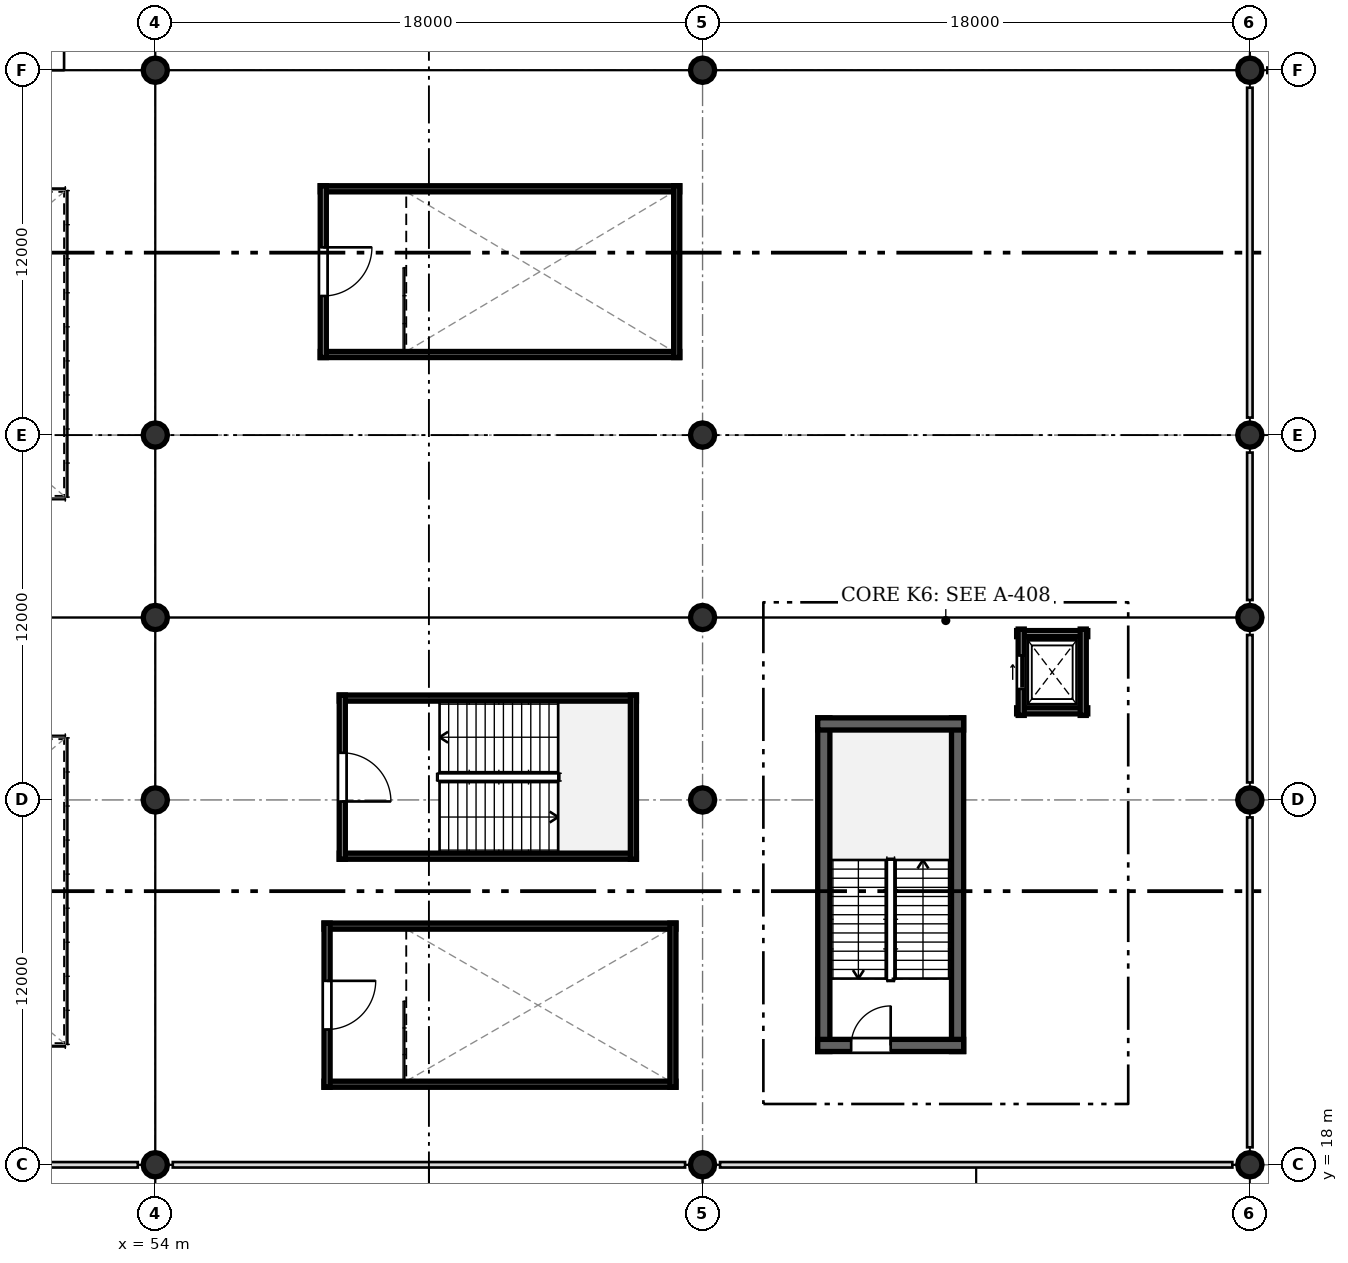
"""IFC4 building model, lengths in metres.
Left out: names, types, materials, properties, quantities, classifications, styles, units other than length and angle.
Written with IfcOpenShell. Run it as: python <this file> out.ifc"""

import sys

from ifc_helpers import new_model, si_unit, direction, frame, frame_2d, origin, origin_2d, place, context, subcontext, project, spatial, rectangle, circle, extrude, element, fill, save


model = new_model("IFC4")
c1 = context("Model", 3, precision=1e-05, world=origin(), true_north=direction((0.0, 1.0)))
c2 = subcontext(c1, "Body", "Model", "MODEL_VIEW")
j1 = project(units=[si_unit("LENGTHUNIT", "METRE"), si_unit("PLANEANGLEUNIT", "RADIAN")], contexts=[c1])
p1 = place(None, origin())
s1 = spatial("IfcSite", under=j1, at=p1, CompositionType="ELEMENT")
p2 = place(p1, origin())
s2 = spatial("IfcBuilding", under=s1, at=p2, CompositionType="ELEMENT")
p3 = place(p2, frame((0.0, 0.0, 6.6)))
s3 = spatial("IfcBuildingStorey", under=s2, at=p3, CompositionType="ELEMENT", Elevation=6.6)
for number, where, z_axis, x_axis in (
    (1, (54.0, 18.0, 0.0), (0.0, 0.0, 1.0), (1.0, 0.0, 0.0)),
    (2, (54.0, 30.0, 0.0), (0.0, 0.0, 1.0), (1.0, 0.0, 0.0)),
    (3, (54.0, 36.0, 0.0), (0.0, 0.0, 1.0), (1.0, 0.0, 0.0)),
    (4, (54.0, 42.0, 0.0), (0.0, 0.0, 1.0), (1.0, 0.0, 0.0)),
    (5, (54.0, 54.0, 0.0), (0.0, 0.0, 1.0), (1.0, 0.0, 0.0)),
    (6, (72.0, 18.0, 0.0), (0.0, 0.0, 1.0), (1.0, 0.0, 0.0)),
    (7, (72.0, 30.0, 0.0), (0.0, 0.0, 1.0), (1.0, 0.0, 0.0)),
    (8, (72.0, 36.0, 0.0), (0.0, 0.0, 1.0), (1.0, 0.0, 0.0)),
    (9, (72.0, 42.0, 0.0), (0.0, 0.0, 1.0), (1.0, 0.0, 0.0)),
    (10, (72.0, 54.0, 0.0), (0.0, 0.0, 1.0), (1.0, 0.0, 0.0)),
    (11, (90.0, 18.0, 0.0), (0.0, 0.0, 1.0), (1.0, 0.0, 0.0)),
    (12, (90.0, 30.0, 0.0), (0.0, 0.0, 1.0), (1.0, 0.0, 0.0)),
    (13, (90.0, 36.0, 0.0), (0.0, 0.0, 1.0), (1.0, 0.0, 0.0)),
    (14, (90.0, 42.0, 0.0), (0.0, 0.0, 1.0), (1.0, 0.0, 0.0)),
    (15, (90.0, 54.0, 0.0), (0.0, 0.0, 1.0), (1.0, 0.0, 0.0)),
):
    element("IfcColumn", number, at=place(p3, frame(where, z_axis=z_axis, x_axis=x_axis)), inside=s3, PredefinedType="COLUMN", context=c2, shape_type="SweptSolid", body=[
        extrude(circle(Radius=0.4, at=origin_2d()), origin(), (0.0, 0.0, 1.0), 4.2),
    ])
for number, where, z_axis, x_axis in (
    (16, (80.387, 21.725, 0.0), (0.0, 0.0, 1.0), (0.0, 1.0, 0.0)),
    (17, (75.988, 32.7, 0.0), (0.0, 0.0, 1.0), (0.0, -1.0, 0.0)),
):
    element("IfcWall", number, at=place(p3, frame(where, z_axis=z_axis, x_axis=x_axis)), inside=s3, PredefinedType="SHEAR", context=c2, shape_type="SweptSolid", body=[
        extrude(rectangle(XDim=10.975, YDim=0.4, at=frame_2d((5.487, 0.0))), origin(), (0.0, 0.0, 1.0), 3.98),
    ])
p4 = place(p3, frame((80.587, 32.5, 0.0), z_axis=(0.0, 0.0, 1.0), x_axis=(-1.0, 0.0, 0.0)))
e18 = element("IfcWall", 18, at=p4, inside=s3, PredefinedType="SHEAR", context=c2, shape_type="SweptSolid", body=[
    extrude(rectangle(XDim=4.8, YDim=0.4, at=frame_2d((2.4, 0.0))), origin(), (0.0, 0.0, 1.0), 3.98),
])
p5 = place(p3, frame((75.788, 21.925, 0.0), z_axis=(0.0, 0.0, 1.0), x_axis=(1.0, 0.0, 0.0)))
e19 = element("IfcWall", 19, at=p5, inside=s3, PredefinedType="SHEAR", context=c2, shape_type="SweptSolid", body=[
    extrude(rectangle(XDim=4.8, YDim=0.4, at=frame_2d((2.4, 0.0))), origin(), (0.0, 0.0, 1.0), 3.98),
])
p6 = place(p5, frame((1.1, 0.0, 0.0)))
e20 = element("IfcOpeningElement", 20, at=p6, cuts=e19, PredefinedType="OPENING", context=c2, shape_type="SweptSolid", body=[
    extrude(rectangle(XDim=1.3, YDim=2.1, at=frame_2d((0.65, 1.05))), frame((0.0, 0.21, 0.0), z_axis=(0.0, -1.0, 0.0), x_axis=(1.0, 0.0, 0.0)), (0.0, 0.0, 1.0), 0.42),
])
for number, where, z_axis, x_axis in (
    (21, (59.55, 20.65, 0.0), (0.0, 0.0, 1.0), (1.0, 0.0, 0.0)),
    (22, (71.125, 25.85, 0.0), (0.0, 0.0, 1.0), (-1.0, 0.0, 0.0)),
):
    element("IfcWall", number, at=place(p3, frame(where, z_axis=z_axis, x_axis=x_axis)), inside=s3, PredefinedType="SOLIDWALL", context=c2, shape_type="SweptSolid", body=[
        extrude(rectangle(XDim=11.575, YDim=0.2, at=frame_2d((5.788, 0.0))), origin(), (0.0, 0.0, 1.0), 2.45),
    ])
p7 = place(p3, frame((71.025, 20.55, 0.0), z_axis=(0.0, 0.0, 1.0), x_axis=(0.0, 1.0, 0.0)))
e23 = element("IfcWall", 23, at=p7, inside=s3, PredefinedType="SOLIDWALL", context=c2, shape_type="SweptSolid", body=[
    extrude(rectangle(XDim=5.4, YDim=0.2, at=frame_2d((2.7, 0.0))), origin(), (0.0, 0.0, 1.0), 2.45),
])
p8 = place(p3, frame((59.65, 25.95, 0.0), z_axis=(0.0, 0.0, 1.0), x_axis=(0.0, -1.0, 0.0)))
e24 = element("IfcWall", 24, at=p8, inside=s3, PredefinedType="SOLIDWALL", context=c2, shape_type="SweptSolid", body=[
    extrude(rectangle(XDim=5.4, YDim=0.2, at=frame_2d((2.7, 0.0))), origin(), (0.0, 0.0, 1.0), 2.45),
])
p9 = place(p8, frame((1.9, 0.0, 0.0)))
e25 = element("IfcOpeningElement", 25, at=p9, cuts=e24, PredefinedType="OPENING", context=c2, shape_type="SweptSolid", body=[
    extrude(rectangle(XDim=1.6, YDim=2.15, at=frame_2d((0.8, 1.075))), frame((0.0, 0.11, 0.0), z_axis=(0.0, -1.0, 0.0), x_axis=(1.0, 0.0, 0.0)), (0.0, 0.0, 1.0), 0.22),
])
for number, where, z_axis, x_axis in (
    (26, (59.425, 44.65, 0.0), (0.0, 0.0, 1.0), (1.0, 0.0, 0.0)),
    (27, (71.25, 50.1, 0.0), (0.0, 0.0, 1.0), (-1.0, 0.0, 0.0)),
):
    element("IfcWall", number, at=place(p3, frame(where, z_axis=z_axis, x_axis=x_axis)), inside=s3, PredefinedType="SOLIDWALL", context=c2, shape_type="SweptSolid", body=[
        extrude(rectangle(XDim=11.825, YDim=0.2, at=frame_2d((5.913, 0.0))), origin(), (0.0, 0.0, 1.0), 2.45),
    ])
p10 = place(p3, frame((71.15, 44.55, 0.0), z_axis=(0.0, 0.0, 1.0), x_axis=(0.0, 1.0, 0.0)))
e28 = element("IfcWall", 28, at=p10, inside=s3, PredefinedType="SOLIDWALL", context=c2, shape_type="SweptSolid", body=[
    extrude(rectangle(XDim=5.65, YDim=0.2, at=frame_2d((2.825, 0.0))), origin(), (0.0, 0.0, 1.0), 2.45),
])
p11 = place(p3, frame((59.525, 50.2, 0.0), z_axis=(0.0, 0.0, 1.0), x_axis=(0.0, -1.0, 0.0)))
e29 = element("IfcWall", 29, at=p11, inside=s3, PredefinedType="SOLIDWALL", context=c2, shape_type="SweptSolid", body=[
    extrude(rectangle(XDim=5.65, YDim=0.2, at=frame_2d((2.825, 0.0))), origin(), (0.0, 0.0, 1.0), 2.45),
])
p12 = place(p11, frame((2.025, 0.0, 0.0)))
e30 = element("IfcOpeningElement", 30, at=p12, cuts=e29, PredefinedType="OPENING", context=c2, shape_type="SweptSolid", body=[
    extrude(rectangle(XDim=1.6, YDim=2.15, at=frame_2d((0.8, 1.075))), frame((0.0, 0.11, 0.0), z_axis=(0.0, -1.0, 0.0), x_axis=(1.0, 0.0, 0.0)), (0.0, 0.0, 1.0), 0.22),
])
for number, where, z_axis, x_axis in (
    (31, (60.05, 28.15, 0.0), (0.0, 0.0, 1.0), (1.0, 0.0, 0.0)),
    (32, (69.825, 33.35, 0.0), (0.0, 0.0, 1.0), (-1.0, 0.0, 0.0)),
):
    element("IfcWall", number, at=place(p3, frame(where, z_axis=z_axis, x_axis=x_axis)), inside=s3, PredefinedType="SOLIDWALL", context=c2, shape_type="SweptSolid", body=[
        extrude(rectangle(XDim=9.775, YDim=0.2, at=frame_2d((4.887, 0.0))), origin(), (0.0, 0.0, 1.0), 3.98),
    ])
p13 = place(p3, frame((69.725, 28.05, 0.0), z_axis=(0.0, 0.0, 1.0), x_axis=(0.0, 1.0, 0.0)))
e33 = element("IfcWall", 33, at=p13, inside=s3, PredefinedType="SOLIDWALL", context=c2, shape_type="SweptSolid", body=[
    extrude(rectangle(XDim=5.4, YDim=0.2, at=frame_2d((2.7, 0.0))), origin(), (0.0, 0.0, 1.0), 3.98),
])
p14 = place(p3, frame((60.15, 33.45, 0.0), z_axis=(0.0, 0.0, 1.0), x_axis=(0.0, -1.0, 0.0)))
e34 = element("IfcWall", 34, at=p14, inside=s3, PredefinedType="SOLIDWALL", context=c2, shape_type="SweptSolid", body=[
    extrude(rectangle(XDim=5.4, YDim=0.2, at=frame_2d((2.7, 0.0))), origin(), (0.0, 0.0, 1.0), 3.955),
])
p15 = place(p14, frame((1.9, 0.0, 0.0)))
e35 = element("IfcOpeningElement", 35, at=p15, cuts=e34, PredefinedType="OPENING", context=c2, shape_type="SweptSolid", body=[
    extrude(rectangle(XDim=1.6, YDim=2.15, at=frame_2d((0.8, 1.075))), frame((0.0, 0.11, 0.0), z_axis=(0.0, -1.0, 0.0), x_axis=(1.0, 0.0, 0.0)), (0.0, 0.0, 1.0), 0.22),
])
p16 = place(p3, frame((82.33, 32.93, 0.0), z_axis=(0.0, 0.0, 1.0), x_axis=(1.0, 0.0, 0.0)))
e36 = element("IfcWall", 36, at=p16, inside=s3, PredefinedType="SOLIDWALL", context=c2, shape_type="SweptSolid", body=[
    extrude(rectangle(XDim=2.34, YDim=0.2, at=frame_2d((1.17, 0.0))), origin(), (0.0, 0.0, 1.0), 3.955),
])
p17 = place(p3, frame((84.67, 35.47, 0.0), z_axis=(0.0, 0.0, 1.0), x_axis=(-1.0, 0.0, 0.0)))
e37 = element("IfcWall", 37, at=p17, inside=s3, PredefinedType="SOLIDWALL", context=c2, shape_type="SweptSolid", body=[
    extrude(rectangle(XDim=2.34, YDim=0.2, at=frame_2d((1.17, 0.0))), origin(), (0.0, 0.0, 1.0), 3.255),
])
p18 = place(p3, frame((82.48, 35.62, 0.0), z_axis=(0.0, 0.0, 1.0), x_axis=(0.0, -1.0, 0.0)))
e38 = element("IfcWall", 38, at=p18, inside=s3, PredefinedType="SOLIDWALL", context=c2, shape_type="SweptSolid", body=[
    extrude(rectangle(XDim=2.84, YDim=0.2, at=frame_2d((1.42, 0.0))), origin(), (0.0, 0.0, 1.0), 3.255),
])
p19 = place(p18, frame((0.87, 0.0, 0.0)))
e39 = element("IfcOpeningElement", 39, at=p19, cuts=e38, PredefinedType="OPENING", context=c2, shape_type="SweptSolid", body=[
    extrude(rectangle(XDim=1.1, YDim=2.15, at=frame_2d((0.55, 1.075))), frame((0.0, 0.11, 0.0), z_axis=(0.0, -1.0, 0.0), x_axis=(1.0, 0.0, 0.0)), (0.0, 0.0, 1.0), 0.22),
])
p20 = place(p3, frame((84.52, 32.78, 0.0), z_axis=(0.0, 0.0, 1.0), x_axis=(0.0, 1.0, 0.0)))
e40 = element("IfcWall", 40, at=p20, inside=s3, PredefinedType="SOLIDWALL", context=c2, shape_type="SweptSolid", body=[
    extrude(rectangle(XDim=2.84, YDim=0.2, at=frame_2d((1.42, 0.0))), origin(), (0.0, 0.0, 1.0), 3.255),
])
p21 = place(p6, origin())
e41 = element("IfcDoor", 41, at=p21, inside=s3, OperationType="SINGLE_SWING_RIGHT", PredefinedType="DOOR", context=c2, shape_type="SweptSolid", body=[
    extrude(rectangle(XDim=1.3, YDim=2.1, at=frame_2d((0.65, 1.05))), frame((0.0, 0.025, 0.0), z_axis=(0.0, -1.0, 0.0), x_axis=(1.0, 0.0, 0.0)), (0.0, 0.0, 1.0), 0.05),
])
fill(e20, e41)
p22 = place(p9, origin())
e42 = element("IfcDoor", 42, at=p22, inside=s3, OperationType="SINGLE_SWING_LEFT", PredefinedType="DOOR", context=c2, shape_type="SweptSolid", body=[
    extrude(rectangle(XDim=1.6, YDim=2.15, at=frame_2d((0.8, 1.075))), frame((0.0, 0.025, 0.0), z_axis=(0.0, -1.0, 0.0), x_axis=(1.0, 0.0, 0.0)), (0.0, 0.0, 1.0), 0.05),
])
fill(e25, e42)
p23 = place(p12, origin())
e43 = element("IfcDoor", 43, at=p23, inside=s3, OperationType="SINGLE_SWING_LEFT", PredefinedType="DOOR", context=c2, shape_type="SweptSolid", body=[
    extrude(rectangle(XDim=1.6, YDim=2.15, at=frame_2d((0.8, 1.075))), frame((0.0, 0.025, 0.0), z_axis=(0.0, -1.0, 0.0), x_axis=(1.0, 0.0, 0.0)), (0.0, 0.0, 1.0), 0.05),
])
fill(e30, e43)
p24 = place(p15, origin())
e44 = element("IfcDoor", 44, at=p24, inside=s3, OperationType="SINGLE_SWING_RIGHT", PredefinedType="DOOR", context=c2, shape_type="SweptSolid", body=[
    extrude(rectangle(XDim=1.6, YDim=2.15, at=frame_2d((0.8, 1.075))), frame((0.0, 0.025, 0.0), z_axis=(0.0, -1.0, 0.0), x_axis=(1.0, 0.0, 0.0)), (0.0, 0.0, 1.0), 0.05),
])
fill(e35, e44)
p25 = place(p19, origin())
e45 = element("IfcDoor", 45, at=p25, inside=s3, OperationType="SLIDING_TO_LEFT", PredefinedType="DOOR", context=c2, shape_type="SweptSolid", body=[
    extrude(rectangle(XDim=1.1, YDim=2.15, at=frame_2d((0.55, 1.075))), frame((0.0, 0.025, 0.0), z_axis=(0.0, -1.0, 0.0), x_axis=(1.0, 0.0, 0.0)), (0.0, 0.0, 1.0), 0.05),
])
fill(e39, e45)
save(model, sys.argv[1])
